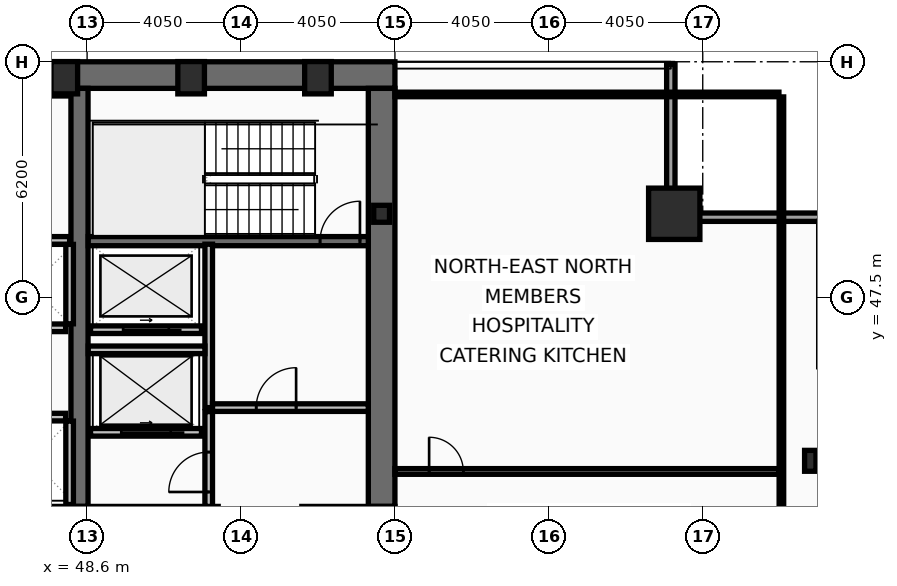
"""IFC4 building model, lengths in metres.
Left out: names, types, materials, properties, quantities, classifications, styles, units other than length and angle.
Written with IfcOpenShell. Run it as: python <this file> out.ifc"""

import sys

from ifc_helpers import new_model, si_unit, direction, frame, frame_2d, origin, origin_2d, place, context, subcontext, project, spatial, rectangle, hollow_rectangle, i_section, extrude, element, fill, save


model = new_model("IFC4")
c1 = context("Model", 3, precision=1e-05, world=origin(), true_north=direction((0.0, 1.0)))
c2 = subcontext(c1, "Body", "Model", "MODEL_VIEW")
j1 = project(units=[si_unit("LENGTHUNIT", "METRE"), si_unit("PLANEANGLEUNIT", "RADIAN")], contexts=[c1])
p1 = place(None, origin())
s1 = spatial("IfcSite", under=j1, at=p1, CompositionType="ELEMENT")
p2 = place(p1, origin())
s2 = spatial("IfcBuilding", under=s1, at=p2, CompositionType="ELEMENT")
p3 = place(p2, frame((0.0, 0.0, 147.0)))
s3 = spatial("IfcBuildingStorey", under=s2, at=p3, CompositionType="ELEMENT", Elevation=147.0)
p4 = place(p3, frame((16.2, 53.35, 0.0), z_axis=(0.0, 0.0, 1.0), x_axis=(1.0, 0.0, 0.0)))
e1 = element("IfcWall", 1, at=p4, inside=s3, PredefinedType="SHEAR", context=c2, shape_type="SweptSolid", body=[
    extrude(rectangle(XDim=40.5, YDim=0.7, at=frame_2d((20.25, 0.0))), origin(), (0.0, 0.0, 1.0), 3.44),
])
p5 = place(p3, frame((56.35, 53.0, 0.0), z_axis=(0.0, 0.0, 1.0), x_axis=(0.0, -1.0, 0.0)))
e2 = element("IfcWall", 2, at=p5, inside=s3, PredefinedType="SHEAR", context=c2, shape_type="SweptSolid", body=[
    extrude(rectangle(XDim=11.0, YDim=0.7, at=frame_2d((5.5, 0.0))), origin(), (0.0, 0.0, 1.0), 3.44),
])
p6 = place(p3, frame((48.4, 42.0, 0.0), z_axis=(0.0, 0.0, 1.0), x_axis=(0.0, 1.0, 0.0)))
e3 = element("IfcWall", 3, at=p6, inside=s3, PredefinedType="SHEAR", context=c2, shape_type="SweptSolid", body=[
    extrude(rectangle(XDim=11.0, YDim=0.45, at=frame_2d((5.5, 0.0))), origin(), (0.0, 0.0, 1.0), 3.44),
])
p7 = place(p3, frame((48.63, 48.98, 0.0), z_axis=(0.0, 0.0, 1.0), x_axis=(1.0, 0.0, 0.0)))
e4 = element("IfcWall", 4, at=p7, inside=s3, PredefinedType="SHEAR", context=c2, shape_type="SweptSolid", body=[
    extrude(rectangle(XDim=7.37, YDim=0.24, at=frame_2d((3.685, 0.0))), origin(), (0.0, 0.0, 1.0), 3.44),
])
p8 = place(p7, frame((6.1, 0.0, 0.0)))
e5 = element("IfcOpeningElement", 5, at=p8, cuts=e4, PredefinedType="OPENING", context=c2, shape_type="SweptSolid", body=[
    extrude(rectangle(XDim=1.05, YDim=2.15, at=frame_2d((0.525, 1.075))), frame((0.0, 0.13, 0.0), z_axis=(0.0, -1.0, 0.0), x_axis=(1.0, 0.0, 0.0)), (0.0, 0.0, 1.0), 0.26),
])
p9 = place(p3, frame((64.05, 49.7, 0.0), z_axis=(0.0, 0.0, 1.0), x_axis=(1.0, 0.0, 0.0)))
e6 = element("IfcColumn", 6, at=p9, inside=s3, PredefinedType="COLUMN", context=c2, shape_type="SweptSolid", body=[
    extrude(hollow_rectangle(XDim=1.35, YDim=1.35, WallThickness=0.065, at=origin_2d()), origin(), (0.0, 0.0, 1.0), 3.6),
])
for number, where, z_axis, x_axis in (
    (7, (48.0, 53.28, 0.0), (0.0, 0.0, 1.0), (1.0, 0.0, 0.0)),
    (8, (51.337, 53.28, 0.0), (0.0, 0.0, 1.0), (1.0, 0.0, 0.0)),
    (9, (54.675, 53.28, 0.0), (0.0, 0.0, 1.0), (1.0, 0.0, 0.0)),
):
    element("IfcColumn", number, at=place(p3, frame(where, z_axis=z_axis, x_axis=x_axis)), inside=s3, PredefinedType="COLUMN", context=c2, shape_type="SweptSolid", body=[
        extrude(hollow_rectangle(XDim=0.7, YDim=0.85, WallThickness=0.05, at=origin_2d()), origin(), (0.0, 0.0, 1.0), 3.6),
    ])
p10 = place(p3, frame((67.63, 43.2, 0.0), z_axis=(0.0, 0.0, 1.0), x_axis=(1.0, 0.0, 0.0)))
e10 = element("IfcColumn", 10, at=p10, inside=s3, PredefinedType="COLUMN", context=c2, shape_type="SweptSolid", body=[
    extrude(i_section(OverallWidth=0.3, OverallDepth=0.55, WebThickness=0.015, FlangeThickness=0.029, at=origin_2d()), origin(), (0.0, 0.0, 1.0), 3.6),
])
p11 = place(p3, frame((56.35, 49.7, 0.0), z_axis=(0.0, 0.0, 1.0), x_axis=(1.0, 0.0, 0.0)))
e11 = element("IfcColumn", 11, at=p11, inside=s3, PredefinedType="COLUMN", context=c2, shape_type="SweptSolid", body=[
    extrude(i_section(OverallWidth=0.416, OverallDepth=0.446, WebThickness=0.039, FlangeThickness=0.063, at=origin_2d()), origin(), (0.0, 0.0, 1.0), 3.6),
])
p12 = place(p3, frame((63.96, 53.63, 0.0), z_axis=(0.0, 0.0, 1.0), x_axis=(0.0, -1.0, 0.0)))
e12 = element("IfcWall", 12, at=p12, inside=s3, PredefinedType="SOLIDWALL", context=c2, shape_type="SweptSolid", body=[
    extrude(rectangle(XDim=3.91, YDim=0.22, at=frame_2d((1.955, 0.0))), origin(), (0.0, 0.0, 1.0), 2.83),
])
p13 = place(p3, frame((63.85, 49.61, 0.0), z_axis=(0.0, 0.0, 1.0), x_axis=(1.0, 0.0, 0.0)))
e13 = element("IfcWall", 13, at=p13, inside=s3, PredefinedType="SOLIDWALL", context=c2, shape_type="SweptSolid", body=[
    extrude(rectangle(XDim=4.22, YDim=0.22, at=frame_2d((2.11, 0.0))), origin(), (0.0, 0.0, 1.0), 2.83),
])
p14 = place(p3, frame((51.61, 43.95, 0.0), z_axis=(0.0, 0.0, 1.0), x_axis=(-1.0, 0.0, 0.0)))
e14 = element("IfcWall", 14, at=p14, inside=s3, PredefinedType="PARTITIONING", context=c2, shape_type="SweptSolid", body=[
    extrude(rectangle(XDim=2.92, YDim=0.2, at=frame_2d((1.46, 0.0))), origin(), (0.0, 0.0, 1.0), 3.44),
])
p15 = place(p14, frame((0.81, 0.0, 0.0)))
e15 = element("IfcOpeningElement", 15, at=p15, cuts=e14, PredefinedType="OPENING", context=c2, shape_type="SweptSolid", body=[
    extrude(rectangle(XDim=1.3, YDim=2.18, at=frame_2d((0.65, 1.09))), frame((0.0, 0.11, 0.0), z_axis=(0.0, -1.0, 0.0), x_axis=(1.0, 0.0, 0.0)), (0.0, 0.0, 1.0), 0.22),
])
p16 = place(p3, frame((51.61, 46.65, 0.0), z_axis=(0.0, 0.0, 1.0), x_axis=(-1.0, 0.0, 0.0)))
e16 = element("IfcWall", 16, at=p16, inside=s3, PredefinedType="PARTITIONING", context=c2, shape_type="SweptSolid", body=[
    extrude(rectangle(XDim=2.92, YDim=0.2, at=frame_2d((1.46, 0.0))), origin(), (0.0, 0.0, 1.0), 3.44),
])
p17 = place(p16, frame((0.86, 0.0, 0.0)))
e17 = element("IfcOpeningElement", 17, at=p17, cuts=e16, PredefinedType="OPENING", context=c2, shape_type="SweptSolid", body=[
    extrude(rectangle(XDim=1.2, YDim=2.18, at=frame_2d((0.6, 1.09))), frame((0.0, 0.11, 0.0), z_axis=(0.0, -1.0, 0.0), x_axis=(1.0, 0.0, 0.0)), (0.0, 0.0, 1.0), 0.22),
])
p18 = place(p3, frame((51.8, 44.6, 0.0), z_axis=(0.0, 0.0, 1.0), x_axis=(0.0, 1.0, 0.0)))
e18 = element("IfcWall", 18, at=p18, inside=s3, PredefinedType="PARTITIONING", context=c2, shape_type="SweptSolid", body=[
    extrude(rectangle(XDim=4.3, YDim=0.2, at=frame_2d((2.15, 0.0))), origin(), (0.0, 0.0, 1.0), 3.44),
])
p19 = place(p3, frame((51.9, 44.6, 0.0), z_axis=(0.0, 0.0, 1.0), x_axis=(1.0, 0.0, 0.0)))
e19 = element("IfcWall", 19, at=p19, inside=s3, PredefinedType="PARTITIONING", context=c2, shape_type="SweptSolid", body=[
    extrude(rectangle(XDim=4.1, YDim=0.2, at=frame_2d((2.05, 0.0))), origin(), (0.0, 0.0, 1.0), 3.44),
])
p20 = place(p19, frame((1.15, 0.0, 0.0)))
e20 = element("IfcOpeningElement", 20, at=p20, cuts=e19, PredefinedType="OPENING", context=c2, shape_type="SweptSolid", body=[
    extrude(rectangle(XDim=1.05, YDim=2.15, at=frame_2d((0.525, 1.075))), frame((0.0, 0.11, 0.0), z_axis=(0.0, -1.0, 0.0), x_axis=(1.0, 0.0, 0.0)), (0.0, 0.0, 1.0), 0.22),
])
p21 = place(p3, frame((48.63, 46.12, 0.0), z_axis=(0.0, 0.0, 1.0), x_axis=(1.0, 0.0, 0.0)))
e21 = element("IfcWall", 21, at=p21, inside=s3, PredefinedType="PARTITIONING", context=c2, shape_type="SweptSolid", body=[
    extrude(rectangle(XDim=3.07, YDim=0.2, at=frame_2d((1.535, 0.0))), origin(), (0.0, 0.0, 1.0), 3.44),
])
p22 = place(p3, frame((51.8, 42.0, 0.0), z_axis=(0.0, 0.0, 1.0), x_axis=(0.0, 1.0, 0.0)))
e22 = element("IfcWall", 22, at=p22, inside=s3, PredefinedType="PARTITIONING", context=c2, shape_type="SweptSolid", body=[
    extrude(rectangle(XDim=2.495, YDim=0.2, at=frame_2d((1.248, 0.0))), origin(), (0.0, 0.0, 1.0), 3.44),
])
p23 = place(p22, frame((0.38, 0.0, 0.0)))
e23 = element("IfcOpeningElement", 23, at=p23, cuts=e22, PredefinedType="OPENING", context=c2, shape_type="SweptSolid", body=[
    extrude(rectangle(XDim=1.05, YDim=2.15, at=frame_2d((0.525, 1.075))), frame((0.0, 0.11, 0.0), z_axis=(0.0, -1.0, 0.0), x_axis=(1.0, 0.0, 0.0)), (0.0, 0.0, 1.0), 0.22),
])
p24 = place(p3, frame((41.825, 46.7, 0.0), z_axis=(0.0, 0.0, 1.0), x_axis=(1.0, 0.0, 0.0)))
e24 = element("IfcWall", 24, at=p24, inside=s3, PredefinedType="PARTITIONING", context=c2, shape_type="SweptSolid", body=[
    extrude(rectangle(XDim=6.21, YDim=0.2, at=frame_2d((3.105, 0.0))), origin(), (0.0, 0.0, 1.0), 3.44),
])
p25 = place(p3, frame((48.14, 46.805, 0.0), z_axis=(0.0, 0.0, 1.0), x_axis=(0.0, 1.0, 0.0)))
e25 = element("IfcWall", 25, at=p25, inside=s3, PredefinedType="PARTITIONING", context=c2, shape_type="SweptSolid", body=[
    extrude(rectangle(XDim=2.09, YDim=0.2, at=frame_2d((1.045, 0.0))), origin(), (0.0, 0.0, 1.0), 3.44),
])
p26 = place(p3, frame((41.825, 44.35, 0.0), z_axis=(0.0, 0.0, 1.0), x_axis=(1.0, 0.0, 0.0)))
e26 = element("IfcWall", 26, at=p26, inside=s3, PredefinedType="PARTITIONING", context=c2, shape_type="SweptSolid", body=[
    extrude(rectangle(XDim=6.21, YDim=0.2, at=frame_2d((3.105, 0.0))), origin(), (0.0, 0.0, 1.0), 3.44),
])
p27 = place(p3, frame((48.14, 42.05, 0.0), z_axis=(0.0, 0.0, 1.0), x_axis=(0.0, 1.0, 0.0)))
e27 = element("IfcWall", 27, at=p27, inside=s3, PredefinedType="PARTITIONING", context=c2, shape_type="SweptSolid", body=[
    extrude(rectangle(XDim=2.195, YDim=0.2, at=frame_2d((1.098, 0.0))), origin(), (0.0, 0.0, 1.0), 3.44),
])
p28 = place(p3, frame((40.58, 52.86, 0.0), z_axis=(0.0, 0.0, 1.0), x_axis=(1.0, 0.0, 0.0)))
e28 = element("IfcWall", 28, at=p28, inside=s3, PredefinedType="PARTITIONING", context=c2, shape_type="SweptSolid", body=[
    extrude(rectangle(XDim=7.56, YDim=0.12, at=frame_2d((3.78, 0.0))), origin(), (0.0, 0.0, 1.0), 3.44),
])
p29 = place(p3, frame((40.58, 49.0, 0.0), z_axis=(0.0, 0.0, 1.0), x_axis=(1.0, 0.0, 0.0)))
e29 = element("IfcWall", 29, at=p29, inside=s3, PredefinedType="PARTITIONING", context=c2, shape_type="SweptSolid", body=[
    extrude(rectangle(XDim=7.56, YDim=0.2, at=frame_2d((3.78, 0.0))), origin(), (0.0, 0.0, 1.0), 3.44),
])
p30 = place(p29, frame((0.16, 0.0, 0.0)))
e30 = element("IfcOpeningElement", 30, at=p30, cuts=e29, PredefinedType="OPENING", context=c2, shape_type="SweptSolid", body=[
    extrude(rectangle(XDim=0.95, YDim=2.1, at=frame_2d((0.475, 1.05))), frame((0.0, 0.11, 0.0), z_axis=(0.0, -1.0, 0.0), x_axis=(1.0, 0.0, 0.0)), (0.0, 0.0, 1.0), 0.22),
])
p31 = place(p3, frame((56.7, 42.92, 0.0), z_axis=(0.0, 0.0, 1.0), x_axis=(1.0, 0.0, 0.0)))
e31 = element("IfcWall", 31, at=p31, inside=s3, PredefinedType="PARTITIONING", context=c2, shape_type="SweptSolid", body=[
    extrude(rectangle(XDim=10.105, YDim=0.15, at=frame_2d((5.052, 0.0))), origin(), (0.0, 0.0, 1.0), 2.73),
])
p32 = place(p31, frame((0.9, 0.0, 0.0)))
e32 = element("IfcOpeningElement", 32, at=p32, cuts=e31, PredefinedType="OPENING", context=c2, shape_type="SweptSolid", body=[
    extrude(rectangle(XDim=0.9, YDim=2.05, at=frame_2d((0.45, 1.025))), frame((0.0, 0.085, 0.0), z_axis=(0.0, -1.0, 0.0), x_axis=(1.0, 0.0, 0.0)), (0.0, 0.0, 1.0), 0.17),
])
p33 = place(p3, frame((66.87, 10.665, 0.0), z_axis=(0.0, 0.0, 1.0), x_axis=(0.0, 1.0, 0.0)))
e33 = element("IfcWall", 33, at=p33, inside=s3, PredefinedType="PARTITIONING", context=c2, shape_type="SweptSolid", body=[
    extrude(rectangle(XDim=42.11, YDim=0.12, at=frame_2d((21.055, 0.0))), origin(), (0.0, 0.0, 1.0), 2.73),
])
p34 = place(p3, frame((56.7, 52.84, 0.0), z_axis=(0.0, 0.0, 1.0), x_axis=(1.0, 0.0, 0.0)))
e34 = element("IfcWall", 34, at=p34, inside=s3, PredefinedType="PARTITIONING", context=c2, shape_type="SweptSolid", body=[
    extrude(rectangle(XDim=10.105, YDim=0.12, at=frame_2d((5.052, 0.0))), origin(), (0.0, 0.0, 1.0), 3.44),
])
p35 = place(p8, origin())
e35 = element("IfcDoor", 35, at=p35, inside=s3, OperationType="SINGLE_SWING_RIGHT", PredefinedType="DOOR", context=c2, shape_type="SweptSolid", body=[
    extrude(rectangle(XDim=1.05, YDim=2.15, at=frame_2d((0.525, 1.075))), frame((0.0, 0.025, 0.0), z_axis=(0.0, -1.0, 0.0), x_axis=(1.0, 0.0, 0.0)), (0.0, 0.0, 1.0), 0.05),
])
fill(e5, e35)
p36 = place(p15, origin())
e36 = element("IfcDoor", 36, at=p36, inside=s3, OperationType="SLIDING_TO_LEFT", PredefinedType="DOOR", context=c2, shape_type="SweptSolid", body=[
    extrude(rectangle(XDim=1.3, YDim=2.18, at=frame_2d((0.65, 1.09))), frame((0.0, 0.025, 0.0), z_axis=(0.0, -1.0, 0.0), x_axis=(1.0, 0.0, 0.0)), (0.0, 0.0, 1.0), 0.05),
])
fill(e15, e36)
p37 = place(p17, origin())
e37 = element("IfcDoor", 37, at=p37, inside=s3, OperationType="SLIDING_TO_LEFT", PredefinedType="DOOR", context=c2, shape_type="SweptSolid", body=[
    extrude(rectangle(XDim=1.2, YDim=2.18, at=frame_2d((0.6, 1.09))), frame((0.0, 0.025, 0.0), z_axis=(0.0, -1.0, 0.0), x_axis=(1.0, 0.0, 0.0)), (0.0, 0.0, 1.0), 0.05),
])
fill(e17, e37)
p38 = place(p20, origin())
e38 = element("IfcDoor", 38, at=p38, inside=s3, OperationType="SINGLE_SWING_RIGHT", PredefinedType="DOOR", context=c2, shape_type="SweptSolid", body=[
    extrude(rectangle(XDim=1.05, YDim=2.15, at=frame_2d((0.525, 1.075))), frame((0.0, 0.025, 0.0), z_axis=(0.0, -1.0, 0.0), x_axis=(1.0, 0.0, 0.0)), (0.0, 0.0, 1.0), 0.05),
])
fill(e20, e38)
p39 = place(p23, origin())
e39 = element("IfcDoor", 39, at=p39, inside=s3, OperationType="SINGLE_SWING_LEFT", PredefinedType="DOOR", context=c2, shape_type="SweptSolid", body=[
    extrude(rectangle(XDim=1.05, YDim=2.15, at=frame_2d((0.525, 1.075))), frame((0.0, 0.025, 0.0), z_axis=(0.0, -1.0, 0.0), x_axis=(1.0, 0.0, 0.0)), (0.0, 0.0, 1.0), 0.05),
])
fill(e23, e39)
p40 = place(p32, origin())
e40 = element("IfcDoor", 40, at=p40, inside=s3, OperationType="SINGLE_SWING_LEFT", PredefinedType="DOOR", context=c2, shape_type="SweptSolid", body=[
    extrude(rectangle(XDim=0.9, YDim=2.05, at=frame_2d((0.45, 1.025))), frame((0.0, 0.025, 0.0), z_axis=(0.0, -1.0, 0.0), x_axis=(1.0, 0.0, 0.0)), (0.0, 0.0, 1.0), 0.05),
])
fill(e32, e40)
save(model, sys.argv[1])
